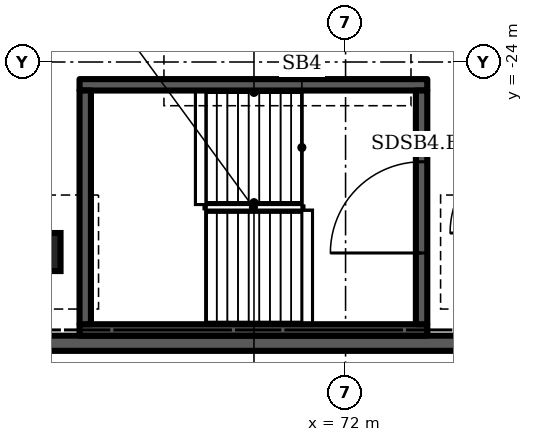
"""IFC4 building model, lengths in metres.
Left out: names, types, materials, properties, quantities, classifications, styles, units other than length and angle.
Written with IfcOpenShell. Run it as: python <this file> out.ifc"""

import sys

from ifc_helpers import new_model, si_unit, direction, frame, frame_2d, origin, origin_2d, place, context, subcontext, project, spatial, rectangle, extrude, element, fill, save


model = new_model("IFC4")
c1 = context("Model", 3, precision=1e-05, world=origin(), true_north=direction((0.0, 1.0)))
c2 = subcontext(c1, "Body", "Model", "MODEL_VIEW")
j1 = project(units=[si_unit("LENGTHUNIT", "METRE"), si_unit("PLANEANGLEUNIT", "RADIAN")], contexts=[c1])
p1 = place(None, origin())
s1 = spatial("IfcSite", under=j1, at=p1, CompositionType="ELEMENT")
p2 = place(p1, origin())
s2 = spatial("IfcBuilding", under=s1, at=p2, CompositionType="ELEMENT")
p3 = place(p2, frame((0.0, 0.0, -14.4)))
s3 = spatial("IfcBuildingStorey", under=s2, at=p3, CompositionType="ELEMENT", Elevation=-14.4)
p4 = place(p3, frame((7.5, -31.4, -0.9), z_axis=(0.0, 0.0, 1.0), x_axis=(1.0, 0.0, 0.0)))
e1 = element("IfcWall", 1, at=p4, inside=s3, PredefinedType="SOLIDWALL", context=c2, shape_type="SweptSolid", body=[
    extrude(rectangle(XDim=75.0, YDim=0.4, at=frame_2d((37.5, 0.0))), origin(), (0.0, 0.0, 1.0), 0.9),
])
p5 = place(p3, frame((64.0, -29.0, 0.0), z_axis=(0.0, 0.0, 1.0), x_axis=(1.0, 0.0, 0.0)))
e2 = element("IfcColumn", 2, at=p5, inside=s3, PredefinedType="COLUMN", context=c2, shape_type="SweptSolid", body=[
    extrude(rectangle(XDim=1.0, YDim=1.0, at=origin_2d()), origin(), (0.0, 0.0, 1.0), 7.2),
])
for number, where, z_axis, x_axis in (
    (3, (65.0, -31.05, 0.0), (0.0, 0.0, 1.0), (1.0, 0.0, 0.0)),
    (4, (65.0, -24.6, 0.0), (0.0, 0.0, 1.0), (1.0, 0.0, 0.0)),
):
    element("IfcWall", number, at=place(p3, frame(where, z_axis=z_axis, x_axis=x_axis)), inside=s3, PredefinedType="SHEAR", context=c2, shape_type="SweptSolid", body=[
        extrude(rectangle(XDim=9.15, YDim=0.3, at=frame_2d((4.575, 0.0))), origin(), (0.0, 0.0, 1.0), 6.9),
    ])
p6 = place(p3, frame((65.15, -30.9, 0.0), z_axis=(0.0, 0.0, 1.0), x_axis=(0.0, 1.0, 0.0)))
e5 = element("IfcWall", 5, at=p6, inside=s3, PredefinedType="SHEAR", context=c2, shape_type="SweptSolid", body=[
    extrude(rectangle(XDim=6.15, YDim=0.3, at=frame_2d((3.075, 0.0))), origin(), (0.0, 0.0, 1.0), 6.9),
])
p7 = place(p3, frame((74.0, -30.9, 0.0), z_axis=(0.0, 0.0, 1.0), x_axis=(0.0, 1.0, 0.0)))
e6 = element("IfcWall", 6, at=p7, inside=s3, PredefinedType="SHEAR", context=c2, shape_type="SweptSolid", body=[
    extrude(rectangle(XDim=6.15, YDim=0.3, at=frame_2d((3.075, 0.0))), origin(), (0.0, 0.0, 1.0), 6.9),
])
p8 = place(p7, frame((1.875, 0.0, 0.0)))
e7 = element("IfcOpeningElement", 7, at=p8, cuts=e6, PredefinedType="OPENING", context=c2, shape_type="SweptSolid", body=[
    extrude(rectangle(XDim=2.4, YDim=2.1, at=frame_2d((1.2, 1.05))), frame((0.0, 0.16, 0.0), z_axis=(0.0, -1.0, 0.0), x_axis=(1.0, 0.0, 0.0)), (0.0, 0.0, 1.0), 0.32),
])
p9 = place(p8, origin())
e8 = element("IfcDoor", 8, at=p9, inside=s3, OperationType="DOUBLE_DOOR_SINGLE_SWING", PredefinedType="DOOR", context=c2, shape_type="SweptSolid", body=[
    extrude(rectangle(XDim=2.4, YDim=2.1, at=frame_2d((1.2, 1.05))), frame((0.0, 0.025, 0.0), z_axis=(0.0, -1.0, 0.0), x_axis=(1.0, 0.0, 0.0)), (0.0, 0.0, 1.0), 0.05),
])
fill(e7, e8)
save(model, sys.argv[1])
